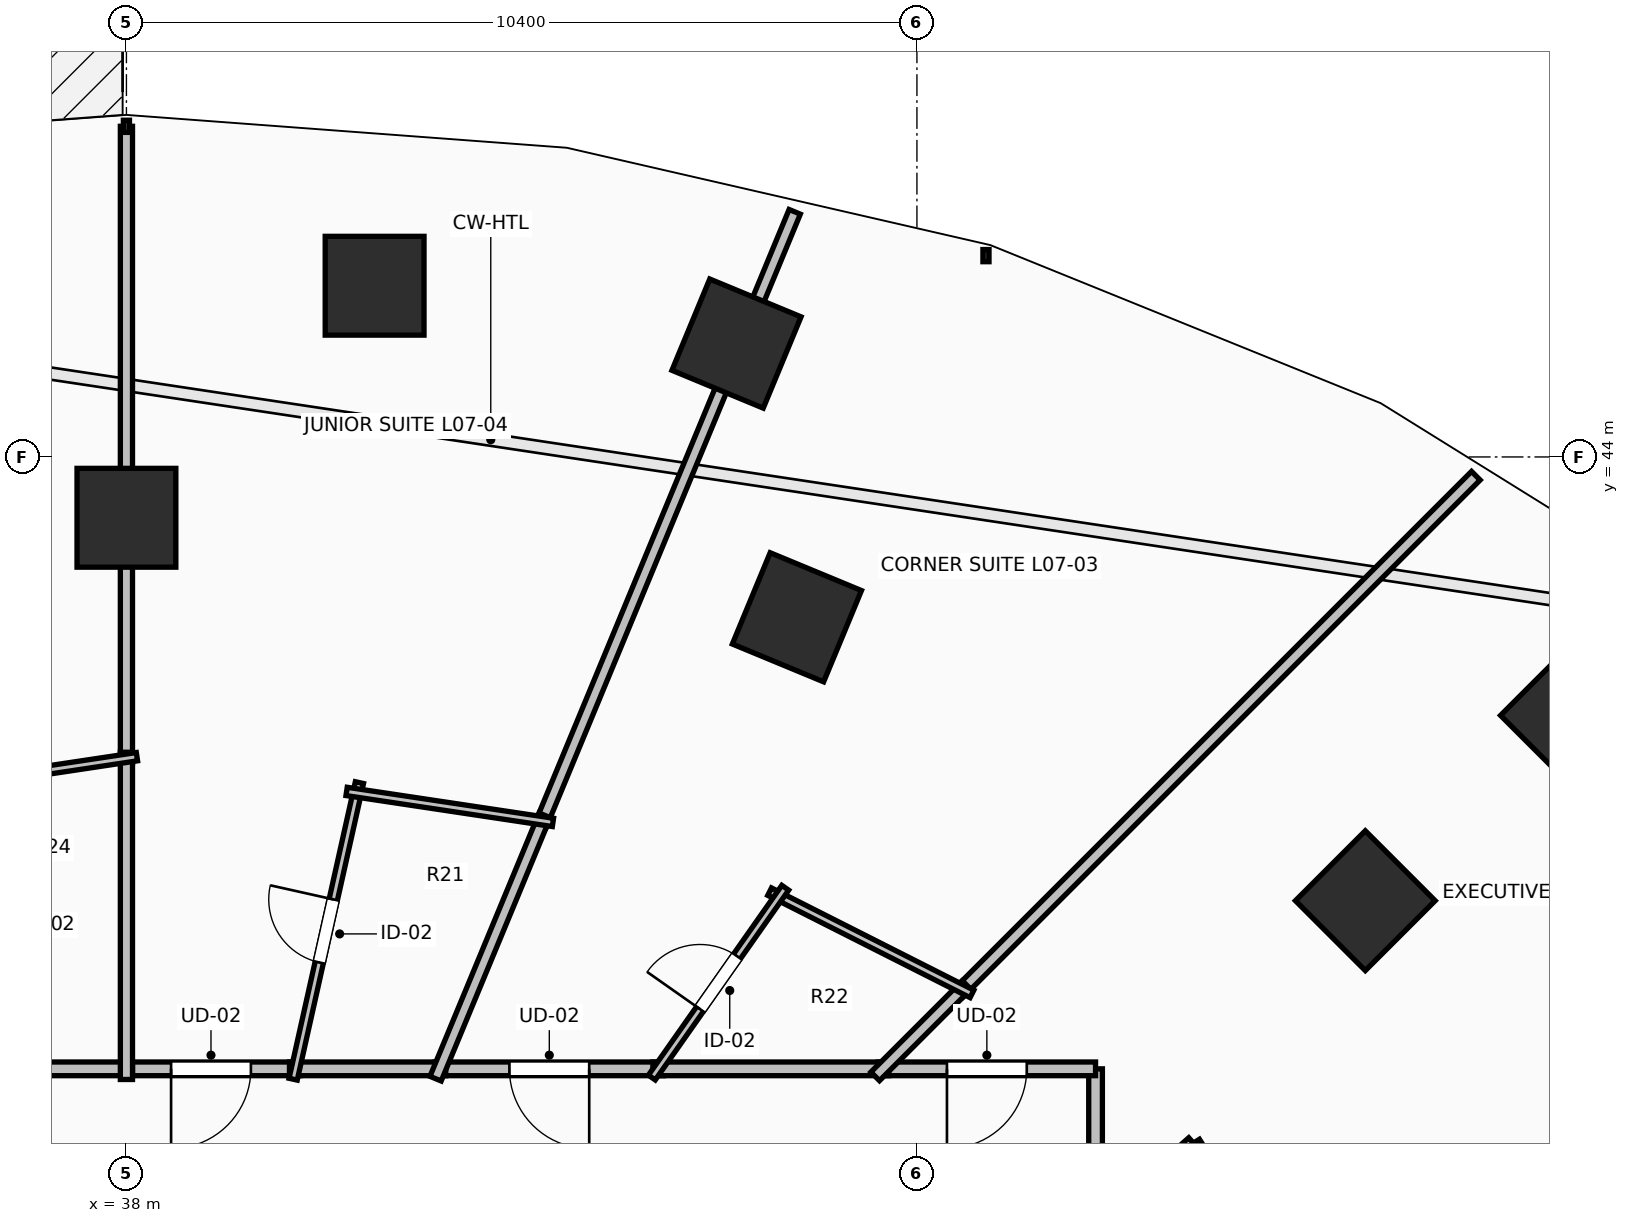
"""IFC4 building model, lengths in metres.
Left out: names, types, materials, properties, quantities, classifications, styles, units other than length and angle.
Written with IfcOpenShell. Run it as: python <this file> out.ifc"""

import sys

from ifc_helpers import new_model, si_unit, direction, frame, frame_2d, origin, origin_2d, place, context, subcontext, project, spatial, rectangle, extrude, element, fill, save


model = new_model("IFC4")
c1 = context("Model", 3, precision=1e-05, world=origin(), true_north=direction((0.0, 1.0)))
c2 = subcontext(c1, "Body", "Model", "MODEL_VIEW")
j1 = project(units=[si_unit("LENGTHUNIT", "METRE"), si_unit("PLANEANGLEUNIT", "RADIAN")], contexts=[c1])
p1 = place(None, origin())
s1 = spatial("IfcSite", under=j1, at=p1, CompositionType="ELEMENT")
p2 = place(p1, origin())
s2 = spatial("IfcBuilding", under=s1, at=p2, CompositionType="ELEMENT")
p3 = place(p2, frame((0.0, 0.0, 31.0)))
s3 = spatial("IfcBuildingStorey", under=s2, at=p3, CompositionType="ELEMENT", Elevation=31.0)
for number, where, z_axis, x_axis in (
    (1, (54.299, 38.162, 0.0), (0.0, 0.0, 1.0), (0.707, 0.707, 0.0)),
    (2, (46.821, 41.891, 0.0), (0.0, 0.0, 1.0), (0.383, 0.924, 0.0)),
    (3, (38.0, 43.2, 0.0), (0.0, 0.0, 1.0), (0.0, 1.0, 0.0)),
    (4, (56.997, 40.6, 0.0), (0.0, 0.0, 1.0), (0.707, 0.707, 0.0)),
    (5, (46.026, 45.492, 0.0), (0.0, 0.0, 1.0), (0.383, 0.924, 0.0)),
    (6, (41.265, 46.252, 0.0), (0.0, 0.0, 1.0), (0.0, 1.0, 0.0)),
):
    element("IfcColumn", number, at=place(p3, frame(where, z_axis=z_axis, x_axis=x_axis)), inside=s3, PredefinedType="COLUMN", context=c2, shape_type="SweptSolid", body=[
        extrude(rectangle(XDim=1.3, YDim=1.3, at=origin_2d()), origin(), (0.0, 0.0, 1.0), 3.5),
    ])
p4 = place(p3, frame((50.75, 34.031, 0.0), z_axis=(0.0, 0.0, 1.0), x_axis=(0.0, 1.0, 0.0)))
e7 = element("IfcWall", 7, at=p4, inside=s3, PredefinedType="PARTITIONING", context=c2, shape_type="SweptSolid", body=[
    extrude(rectangle(XDim=1.919, YDim=0.18, at=frame_2d((0.959, 0.0))), origin(), (0.0, 0.0, 1.0), 2.432),
])
p5 = place(p3, frame((50.75, 35.95, 0.0), z_axis=(0.0, 0.0, 1.0), x_axis=(-1.0, 0.0, 0.0)))
e8 = element("IfcWall", 8, at=p5, inside=s3, PredefinedType="PARTITIONING", context=c2, shape_type="SweptSolid", body=[
    extrude(rectangle(XDim=2.86, YDim=0.18, at=frame_2d((1.43, 0.0))), origin(), (0.0, 0.0, 1.0), 2.432),
])
p6 = place(p5, frame((0.905, 0.0, 0.0)))
e9 = element("IfcOpeningElement", 9, at=p6, cuts=e8, PredefinedType="OPENING", context=c2, shape_type="SweptSolid", body=[
    extrude(rectangle(XDim=1.05, YDim=2.2, at=frame_2d((0.525, 1.1))), frame((0.0, 0.105, 0.0), z_axis=(0.0, -1.0, 0.0), x_axis=(1.0, 0.0, 0.0)), (0.0, 0.0, 1.0), 0.21),
])
p7 = place(p3, frame((45.066, 35.95, 0.0), z_axis=(0.0, 0.0, 1.0), x_axis=(-1.0, 0.0, 0.0)))
e10 = element("IfcWall", 10, at=p7, inside=s3, PredefinedType="PARTITIONING", context=c2, shape_type="SweptSolid", body=[
    extrude(rectangle(XDim=3.005, YDim=0.18, at=frame_2d((1.502, 0.0))), origin(), (0.0, 0.0, 1.0), 3.24),
])
p8 = place(p7, frame((0.978, 0.0, 0.0)))
e11 = element("IfcOpeningElement", 11, at=p8, cuts=e10, PredefinedType="OPENING", context=c2, shape_type="SweptSolid", body=[
    extrude(rectangle(XDim=1.05, YDim=2.2, at=frame_2d((0.525, 1.1))), frame((0.0, 0.105, 0.0), z_axis=(0.0, -1.0, 0.0), x_axis=(1.0, 0.0, 0.0)), (0.0, 0.0, 1.0), 0.21),
])
p9 = place(p3, frame((48.03, 35.95, 0.0), z_axis=(0.0, 0.0, 1.0), x_axis=(-1.0, 0.0, 0.0)))
e12 = element("IfcWall", 12, at=p9, inside=s3, PredefinedType="PARTITIONING", context=c2, shape_type="SweptSolid", body=[
    extrude(rectangle(XDim=3.104, YDim=0.18, at=frame_2d((1.552, 0.0))), origin(), (0.0, 0.0, 1.0), 2.432),
])
p10 = place(p3, frame((40.285, 35.95, 0.0), z_axis=(0.0, 0.0, 1.0), x_axis=(-1.0, 0.0, 0.0)))
e13 = element("IfcWall", 13, at=p10, inside=s3, PredefinedType="PARTITIONING", context=c2, shape_type="SweptSolid", body=[
    extrude(rectangle(XDim=2.345, YDim=0.18, at=frame_2d((1.172, 0.0))), origin(), (0.0, 0.0, 1.0), 3.24),
])
p11 = place(p10, frame((0.647, 0.0, 0.0)))
e14 = element("IfcOpeningElement", 14, at=p11, cuts=e13, PredefinedType="OPENING", context=c2, shape_type="SweptSolid", body=[
    extrude(rectangle(XDim=1.05, YDim=2.2, at=frame_2d((0.525, 1.1))), frame((0.0, 0.105, 0.0), z_axis=(0.0, -1.0, 0.0), x_axis=(1.0, 0.0, 0.0)), (0.0, 0.0, 1.0), 0.21),
])
p12 = place(p3, frame((42.201, 35.95, 0.0), z_axis=(0.0, 0.0, 1.0), x_axis=(-1.0, 0.0, 0.0)))
e15 = element("IfcWall", 15, at=p12, inside=s3, PredefinedType="PARTITIONING", context=c2, shape_type="SweptSolid", body=[
    extrude(rectangle(XDim=2.056, YDim=0.18, at=frame_2d((1.028, 0.0))), origin(), (0.0, 0.0, 1.0), 3.24),
])
p13 = place(p3, frame((38.08, 35.95, 0.0), z_axis=(0.0, 0.0, 1.0), x_axis=(-1.0, 0.0, 0.0)))
e16 = element("IfcWall", 16, at=p13, inside=s3, PredefinedType="PARTITIONING", context=c2, shape_type="SweptSolid", body=[
    extrude(rectangle(XDim=1.897, YDim=0.18, at=frame_2d((0.948, 0.0))), origin(), (0.0, 0.0, 1.0), 3.24),
])
p14 = place(p3, frame((63.793, 36.684, 0.0), z_axis=(0.0, 0.0, 1.0), x_axis=(-0.923866969846, -0.382713759914, 0.0)))
e17 = element("IfcWall", 17, at=p14, inside=s3, PredefinedType="PARTITIONING", context=c2, shape_type="SweptSolid", body=[
    extrude(rectangle(XDim=14.118, YDim=0.16, at=frame_2d((7.059, 0.0))), origin(), (0.0, 0.0, 1.0), 2.432),
])
p15 = place(p3, frame((51.935, 35.007, 0.0), z_axis=(0.0, 0.0, 1.0), x_axis=(0.662059609276, -0.749451181709, 0.0)))
e18 = element("IfcWall", 18, at=p15, inside=s3, PredefinedType="PARTITIONING", context=c2, shape_type="SweptSolid", body=[
    extrude(rectangle(XDim=3.299, YDim=0.11, at=frame_2d((1.65, 0.0))), origin(), (0.0, 0.0, 1.0), 2.432),
])
p16 = place(p15, frame((1.225, 0.0, 0.0)))
e19 = element("IfcOpeningElement", 19, at=p16, cuts=e18, PredefinedType="OPENING", context=c2, shape_type="SweptSolid", body=[
    extrude(rectangle(XDim=0.85, YDim=2.1, at=frame_2d((0.425, 1.05))), frame((0.0, 0.07, 0.0), z_axis=(0.0, -1.0, 0.0), x_axis=(1.0, 0.0, 0.0)), (0.0, 0.0, 1.0), 0.14),
])
p17 = place(p3, frame((50.632, 34.016, 0.0), z_axis=(0.0, 0.0, 1.0), x_axis=(0.844361394482, 0.535774052665, 0.0)))
e20 = element("IfcWall", 20, at=p17, inside=s3, PredefinedType="PARTITIONING", context=c2, shape_type="SweptSolid", body=[
    extrude(rectangle(XDim=1.793, YDim=0.11, at=frame_2d((0.897, 0.0))), origin(), (0.0, 0.0, 1.0), 2.922),
])
p18 = place(p3, frame((55.753, 43.753, 0.0), z_axis=(0.0, 0.0, 1.0), x_axis=(-0.707106781187, -0.707106781187, 0.0)))
e21 = element("IfcWall", 21, at=p18, inside=s3, PredefinedType="PARTITIONING", context=c2, shape_type="SweptSolid", body=[
    extrude(rectangle(XDim=9.615, YDim=0.16, at=frame_2d((4.808, 0.0))), origin(), (0.0, 0.0, 1.0), 2.624),
])
p19 = place(p3, frame((49.053, 37.053, 0.0), z_axis=(0.0, 0.0, 1.0), x_axis=(-0.707106781187, -0.707106781187, 0.0)))
e22 = element("IfcWall", 22, at=p19, inside=s3, PredefinedType="PARTITIONING", context=c2, shape_type="SweptSolid", body=[
    extrude(rectangle(XDim=1.7, YDim=0.16, at=frame_2d((0.85, 0.0))), origin(), (0.0, 0.0, 1.0), 2.432),
])
p20 = place(p3, frame((46.462, 38.281, 0.0), z_axis=(0.0, 0.0, 1.0), x_axis=(0.892486842203, -0.451073426944, 0.0)))
e23 = element("IfcWall", 23, at=p20, inside=s3, PredefinedType="PARTITIONING", context=c2, shape_type="SweptSolid", body=[
    extrude(rectangle(XDim=2.982, YDim=0.11, at=frame_2d((1.491, 0.0))), origin(), (0.0, 0.0, 1.0), 2.432),
])
p21 = place(p3, frame((44.913, 35.835, 0.0), z_axis=(0.0, 0.0, 1.0), x_axis=(0.574986040322, 0.818163219312, 0.0)))
e24 = element("IfcWall", 24, at=p21, inside=s3, PredefinedType="PARTITIONING", context=c2, shape_type="SweptSolid", body=[
    extrude(rectangle(XDim=3.052, YDim=0.11, at=frame_2d((1.526, 0.0))), origin(), (0.0, 0.0, 1.0), 2.922),
])
p22 = place(p21, frame((1.101, 0.0, 0.0)))
e25 = element("IfcOpeningElement", 25, at=p22, cuts=e24, PredefinedType="OPENING", context=c2, shape_type="SweptSolid", body=[
    extrude(rectangle(XDim=0.85, YDim=2.1, at=frame_2d((0.425, 1.05))), frame((0.0, 0.07, 0.0), z_axis=(0.0, -1.0, 0.0), x_axis=(1.0, 0.0, 0.0)), (0.0, 0.0, 1.0), 0.14),
])
p23 = place(p3, frame((46.792, 47.225, 0.0), z_axis=(0.0, 0.0, 1.0), x_axis=(-0.382750893248, -0.923851586413, 0.0)))
e26 = element("IfcWall", 26, at=p23, inside=s3, PredefinedType="PARTITIONING", context=c2, shape_type="SweptSolid", body=[
    extrude(rectangle(XDim=8.734, YDim=0.16, at=frame_2d((4.367, 0.0))), origin(), (0.0, 0.0, 1.0), 2.874),
])
p24 = place(p3, frame((43.503, 39.285, 0.0), z_axis=(0.0, 0.0, 1.0), x_axis=(-0.382867331148, -0.923803337697, 0.0)))
e27 = element("IfcWall", 27, at=p24, inside=s3, PredefinedType="PARTITIONING", context=c2, shape_type="SweptSolid", body=[
    extrude(rectangle(XDim=3.75, YDim=0.16, at=frame_2d((1.875, 0.0))), origin(), (0.0, 0.0, 1.0), 2.922),
])
p25 = place(p3, frame((40.194, 35.813, 0.0), z_axis=(0.0, 0.0, 1.0), x_axis=(0.21804880916, 0.975937865248, 0.0)))
e28 = element("IfcWall", 28, at=p25, inside=s3, PredefinedType="PARTITIONING", context=c2, shape_type="SweptSolid", body=[
    extrude(rectangle(XDim=3.998, YDim=0.11, at=frame_2d((1.999, 0.0))), origin(), (0.0, 0.0, 1.0), 2.922),
])
p26 = place(p25, frame((1.574, 0.0, 0.0)))
e29 = element("IfcOpeningElement", 29, at=p26, cuts=e28, PredefinedType="OPENING", context=c2, shape_type="SweptSolid", body=[
    extrude(rectangle(XDim=0.85, YDim=2.1, at=frame_2d((0.425, 1.05))), frame((0.0, 0.07, 0.0), z_axis=(0.0, -1.0, 0.0), x_axis=(1.0, 0.0, 0.0)), (0.0, 0.0, 1.0), 0.14),
])
p27 = place(p3, frame((40.896, 39.6, 0.0), z_axis=(0.0, 0.0, 1.0), x_axis=(0.98891024541, -0.148514398367, 0.0)))
e30 = element("IfcWall", 30, at=p27, inside=s3, PredefinedType="PARTITIONING", context=c2, shape_type="SweptSolid", body=[
    extrude(rectangle(XDim=2.745, YDim=0.11, at=frame_2d((1.373, 0.0))), origin(), (0.0, 0.0, 1.0), 3.24),
])
p28 = place(p3, frame((38.0, 48.35, 0.0), z_axis=(0.0, 0.0, 1.0), x_axis=(0.0, -1.0, 0.0)))
e31 = element("IfcWall", 31, at=p28, inside=s3, PredefinedType="PARTITIONING", context=c2, shape_type="SweptSolid", body=[
    extrude(rectangle(XDim=8.375, YDim=0.16, at=frame_2d((4.188, 0.0))), origin(), (0.0, 0.0, 1.0), 2.432),
])
p29 = place(p3, frame((38.0, 40.115, 0.0), z_axis=(0.0, 0.0, 1.0), x_axis=(0.0, -1.0, 0.0)))
e32 = element("IfcWall", 32, at=p29, inside=s3, PredefinedType="PARTITIONING", context=c2, shape_type="SweptSolid", body=[
    extrude(rectangle(XDim=4.305, YDim=0.16, at=frame_2d((2.152, 0.0))), origin(), (0.0, 0.0, 1.0), 2.922),
])
p30 = place(p3, frame((35.475, 39.656, 0.0), z_axis=(0.0, 0.0, 1.0), x_axis=(0.988878442063, 0.148726012595, 0.0)))
e33 = element("IfcWall", 33, at=p30, inside=s3, PredefinedType="PARTITIONING", context=c2, shape_type="SweptSolid", body=[
    extrude(rectangle(XDim=2.694, YDim=0.11, at=frame_2d((1.347, 0.0))), origin(), (0.0, 0.0, 1.0), 3.24),
])
p31 = place(p6, origin())
e34 = element("IfcDoor", 34, at=p31, inside=s3, OperationType="SINGLE_SWING_RIGHT", PredefinedType="DOOR", context=c2, shape_type="SweptSolid", body=[
    extrude(rectangle(XDim=1.05, YDim=2.2, at=frame_2d((0.525, 1.1))), frame((0.0, 0.025, 0.0), z_axis=(0.0, -1.0, 0.0), x_axis=(1.0, 0.0, 0.0)), (0.0, 0.0, 1.0), 0.05),
])
fill(e9, e34)
p32 = place(p8, origin())
e35 = element("IfcDoor", 35, at=p32, inside=s3, OperationType="SINGLE_SWING_LEFT", PredefinedType="DOOR", context=c2, shape_type="SweptSolid", body=[
    extrude(rectangle(XDim=1.05, YDim=2.2, at=frame_2d((0.525, 1.1))), frame((0.0, 0.025, 0.0), z_axis=(0.0, -1.0, 0.0), x_axis=(1.0, 0.0, 0.0)), (0.0, 0.0, 1.0), 0.05),
])
fill(e11, e35)
p33 = place(p11, origin())
e36 = element("IfcDoor", 36, at=p33, inside=s3, OperationType="SINGLE_SWING_RIGHT", PredefinedType="DOOR", context=c2, shape_type="SweptSolid", body=[
    extrude(rectangle(XDim=1.05, YDim=2.2, at=frame_2d((0.525, 1.1))), frame((0.0, 0.025, 0.0), z_axis=(0.0, -1.0, 0.0), x_axis=(1.0, 0.0, 0.0)), (0.0, 0.0, 1.0), 0.05),
])
fill(e14, e36)
p34 = place(p22, origin())
e37 = element("IfcDoor", 37, at=p34, inside=s3, OperationType="SINGLE_SWING_LEFT", PredefinedType="DOOR", context=c2, shape_type="SweptSolid", body=[
    extrude(rectangle(XDim=0.85, YDim=2.1, at=frame_2d((0.425, 1.05))), frame((0.0, 0.025, 0.0), z_axis=(0.0, -1.0, 0.0), x_axis=(1.0, 0.0, 0.0)), (0.0, 0.0, 1.0), 0.05),
])
fill(e25, e37)
p35 = place(p26, origin())
e38 = element("IfcDoor", 38, at=p35, inside=s3, OperationType="SINGLE_SWING_RIGHT", PredefinedType="DOOR", context=c2, shape_type="SweptSolid", body=[
    extrude(rectangle(XDim=0.85, YDim=2.1, at=frame_2d((0.425, 1.05))), frame((0.0, 0.025, 0.0), z_axis=(0.0, -1.0, 0.0), x_axis=(1.0, 0.0, 0.0)), (0.0, 0.0, 1.0), 0.05),
])
fill(e29, e38)
save(model, sys.argv[1])
